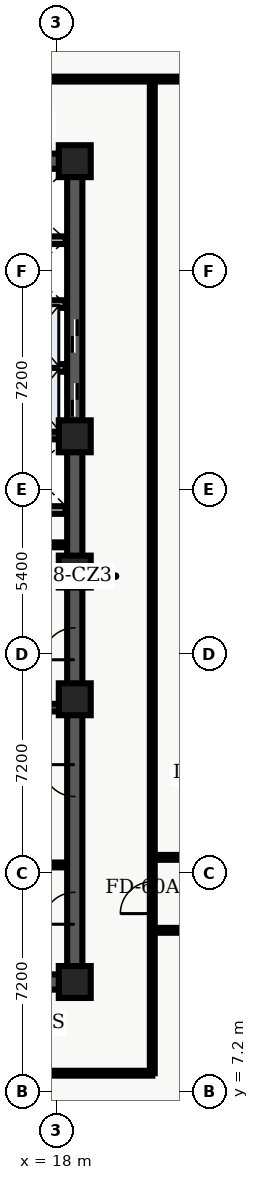
"""IFC4 building model, lengths in metres.
Left out: names, types, materials, properties, quantities, classifications, styles, units other than length and angle.
Written with IfcOpenShell. Run it as: python <this file> out.ifc"""

import sys

from ifc_helpers import new_model, entity, si_unit, converted_unit, direction, frame, origin_with_axes, origin_2d_with_axis, place, context, subcontext, project, spatial, polyline, rectangle, outline, extrude, element, fill, save


model = new_model("IFC4")
c1 = context("Model", 3, precision=1e-05, world=origin_with_axes(), true_north=direction((0.0, 1.0)))
c2 = subcontext(c1, "Body", "Model", "MODEL_VIEW")
j1 = project(units=[si_unit("LENGTHUNIT", "METRE"), converted_unit("PLANEANGLEUNIT", "DEGREE", entity("IfcPlaneAngleMeasure", 0.017), si_unit("PLANEANGLEUNIT", "RADIAN"), dimensions=[0, 0, 0, 0, 0, 0, 0])], contexts=[c1])
p1 = place(None, origin_with_axes())
s1 = spatial("IfcSite", under=j1, at=p1, CompositionType="ELEMENT")
p2 = place(p1, origin_with_axes())
s2 = spatial("IfcBuilding", under=s1, at=p2, CompositionType="ELEMENT")
p3 = place(p2, frame((0.0, 0.0, 156.3), z_axis=(0.0, 0.0, 1.0), x_axis=(1.0, 0.0, 0.0)))
s3 = spatial("IfcBuildingStorey", under=s2, at=p3, CompositionType="ELEMENT", Elevation=156.3)
p4 = place(p3, frame((11.4, 10.8, 0.0), z_axis=(0.0, 0.0, 1.0), x_axis=(1.0, 0.0, 0.0)))
e1 = element("IfcWall", 1, at=p4, inside=s3, PredefinedType="SHEAR", context=c2, shape_type="SweptSolid", body=[
    extrude(outline(polyline([(0.0, -0.25), (7.2, -0.25), (7.2, 0.25), (0.0, 0.25), (0.0, -0.25)])), origin_with_axes(), (0.0, 0.0, 1.0), 3.66),
])
p5 = place(p4, frame((2.625, 0.0, 0.0), z_axis=(0.0, 0.0, 1.0), x_axis=(1.0, 0.0, 0.0)))
e2 = element("IfcOpeningElement", 2, at=p5, cuts=e1, PredefinedType="OPENING", context=c2, shape_type="SweptSolid", body=[
    extrude(rectangle(XDim=1.05, YDim=0.52, at=origin_2d_with_axis()), origin_with_axes(), (0.0, 0.0, 1.0), 2.15),
])
p6 = place(p3, frame((11.4, 37.8, 0.0), z_axis=(0.0, 0.0, 1.0), x_axis=(1.0, 0.0, 0.0)))
e3 = element("IfcWall", 3, at=p6, inside=s3, PredefinedType="SHEAR", context=c2, shape_type="SweptSolid", body=[
    extrude(outline(polyline([(0.0, -0.25), (7.2, -0.25), (7.2, 0.25), (0.0, 0.25), (0.0, -0.25)])), origin_with_axes(), (0.0, 0.0, 1.0), 3.66),
])
p7 = place(p6, frame((2.625, 0.0, 0.0), z_axis=(0.0, 0.0, 1.0), x_axis=(1.0, 0.0, 0.0)))
e4 = element("IfcOpeningElement", 4, at=p7, cuts=e3, PredefinedType="OPENING", context=c2, shape_type="SweptSolid", body=[
    extrude(rectangle(XDim=1.05, YDim=0.52, at=origin_2d_with_axis()), origin_with_axes(), (0.0, 0.0, 1.0), 2.15),
])
p8 = place(p3, frame((18.6, 10.8, 0.0), z_axis=(0.0, 0.0, 1.0), x_axis=(0.0, 1.0, 0.0)))
e5 = element("IfcWall", 5, at=p8, inside=s3, PredefinedType="SHEAR", context=c2, shape_type="SweptSolid", body=[
    extrude(outline(polyline([(0.0, -0.25), (13.5, -0.25), (13.5, 0.25), (0.0, 0.25), (0.0, -0.25)])), origin_with_axes(), (0.0, 0.0, 1.0), 3.66),
])
p9 = place(p8, frame((11.125, 0.0, 0.0), z_axis=(0.0, 0.0, 1.0), x_axis=(1.0, 0.0, 0.0)))
e6 = element("IfcOpeningElement", 6, at=p9, cuts=e5, PredefinedType="OPENING", context=c2, shape_type="SweptSolid", body=[
    extrude(rectangle(XDim=1.05, YDim=0.52, at=origin_2d_with_axis()), origin_with_axes(), (0.0, 0.0, 1.0), 2.15),
])
p10 = place(p8, frame((2.425, 0.0, 0.0), z_axis=(0.0, 0.0, 1.0), x_axis=(1.0, 0.0, 0.0)))
e7 = element("IfcOpeningElement", 7, at=p10, cuts=e5, PredefinedType="OPENING", context=c2, shape_type="SweptSolid", body=[
    extrude(rectangle(XDim=1.05, YDim=0.52, at=origin_2d_with_axis()), origin_with_axes(), (0.0, 0.0, 1.0), 2.15),
])
p11 = place(p8, frame((6.625, 0.0, 0.0), z_axis=(0.0, 0.0, 1.0), x_axis=(1.0, 0.0, 0.0)))
e8 = element("IfcOpeningElement", 8, at=p11, cuts=e5, PredefinedType="OPENING", context=c2, shape_type="SweptSolid", body=[
    extrude(rectangle(XDim=1.05, YDim=0.52, at=origin_2d_with_axis()), origin_with_axes(), (0.0, 0.0, 1.0), 2.15),
])
p12 = place(p3, frame((18.6, 24.3, 0.0), z_axis=(0.0, 0.0, 1.0), x_axis=(0.0, 1.0, 0.0)))
e9 = element("IfcWall", 9, at=p12, inside=s3, PredefinedType="SHEAR", context=c2, shape_type="SweptSolid", body=[
    extrude(outline(polyline([(0.0, -0.25), (13.5, -0.25), (13.5, 0.25), (0.0, 0.25), (0.0, -0.25)])), origin_with_axes(), (0.0, 0.0, 1.0), 3.66),
])
p13 = place(p12, frame((5.65, 0.0, 0.0), z_axis=(0.0, 0.0, 1.0), x_axis=(1.0, 0.0, 0.0)))
e10 = element("IfcOpeningElement", 10, at=p13, cuts=e9, PredefinedType="OPENING", context=c2, shape_type="SweptSolid", body=[
    extrude(rectangle(XDim=1.1, YDim=0.52, at=origin_2d_with_axis()), origin_with_axes(), (0.0, 0.0, 1.0), 2.15),
])
p14 = place(p12, frame((7.75, 0.0, 0.0), z_axis=(0.0, 0.0, 1.0), x_axis=(1.0, 0.0, 0.0)))
e11 = element("IfcOpeningElement", 11, at=p14, cuts=e9, PredefinedType="OPENING", context=c2, shape_type="SweptSolid", body=[
    extrude(rectangle(XDim=1.1, YDim=0.52, at=origin_2d_with_axis()), origin_with_axes(), (0.0, 0.0, 1.0), 2.15),
])
for number, where, z_axis, x_axis in (
    (12, (11.65, 19.825, 0.0), (0.0, 0.0, 1.0), (1.0, 0.0, 0.0)),
    (13, (11.65, 28.775, 0.0), (0.0, 0.0, 1.0), (1.0, 0.0, 0.0)),
):
    element("IfcWall", number, at=place(p3, frame(where, z_axis=z_axis, x_axis=x_axis)), inside=s3, PredefinedType="SHEAR", context=c2, shape_type="SweptSolid", body=[
        extrude(outline(polyline([(0.0, -0.125), (6.7, -0.125), (6.7, 0.125), (0.0, 0.125), (0.0, -0.125)])), origin_with_axes(), (0.0, 0.0, 1.0), 3.66),
    ])
p15 = place(p3, frame((11.7, 24.1, 0.0), z_axis=(0.0, 0.0, 1.0), x_axis=(1.0, 0.0, 0.0)))
e14 = element("IfcWall", 14, at=p15, inside=s3, PredefinedType="SOLIDWALL", context=c2, shape_type="SweptSolid", body=[
    extrude(outline(polyline([(0.0, -0.125), (6.6, -0.125), (6.6, 0.125), (0.0, 0.125), (0.0, -0.125)])), origin_with_axes(), (0.0, 0.0, 1.0), 2.7),
])
p16 = place(p15, frame((3.75, 0.0, 0.0), z_axis=(0.0, 0.0, 1.0), x_axis=(1.0, 0.0, 0.0)))
e15 = element("IfcOpeningElement", 15, at=p16, cuts=e14, PredefinedType="OPENING", context=c2, shape_type="SweptSolid", body=[
    extrude(rectangle(XDim=0.9, YDim=0.27, at=origin_2d_with_axis()), origin_with_axes(), (0.0, 0.0, 1.0), 2.15),
])
p17 = place(p3, frame((11.7, 26.325, 0.0), z_axis=(0.0, 0.0, 1.0), x_axis=(1.0, 0.0, 0.0)))
e16 = element("IfcWall", 16, at=p17, inside=s3, PredefinedType="SOLIDWALL", context=c2, shape_type="SweptSolid", body=[
    extrude(outline(polyline([(0.0, -0.125), (6.6, -0.125), (6.6, 0.125), (0.0, 0.125), (0.0, -0.125)])), origin_with_axes(), (0.0, 0.0, 1.0), 2.7),
])
p18 = place(p17, frame((3.5, 0.0, 0.0), z_axis=(0.0, 0.0, 1.0), x_axis=(1.0, 0.0, 0.0)))
e17 = element("IfcOpeningElement", 17, at=p18, cuts=e16, PredefinedType="OPENING", context=c2, shape_type="SweptSolid", body=[
    extrude(rectangle(XDim=0.9, YDim=0.27, at=origin_2d_with_axis()), origin_with_axes(), (0.0, 0.0, 1.0), 2.15),
])
for number, where, z_axis, x_axis in (
    (18, (18.6, 10.8, 0.0), (0.0, 0.0, 1.0), (1.0, 0.0, 0.0)),
    (19, (18.6, 20.1, 0.0), (0.0, 0.0, 1.0), (1.0, 0.0, 0.0)),
    (20, (18.6, 24.3, 0.0), (0.0, 0.0, 1.0), (1.0, 0.0, 0.0)),
    (21, (18.6, 28.75, 0.0), (0.0, 0.0, 1.0), (1.0, 0.0, 0.0)),
    (22, (18.6, 37.8, 0.0), (0.0, 0.0, 1.0), (1.0, 0.0, 0.0)),
):
    element("IfcColumn", number, at=place(p3, frame(where, z_axis=z_axis, x_axis=x_axis)), inside=s3, PredefinedType="COLUMN", context=c2, shape_type="SweptSolid", body=[
        extrude(rectangle(XDim=1.05, YDim=1.05, at=origin_2d_with_axis()), origin_with_axes(), (0.0, 0.0, 1.0), 3.9),
    ])
p19 = place(p3, frame((14.62, 25.18, 0.0), z_axis=(0.0, 0.0, 1.0), x_axis=(1.0, 0.0, 0.0)))
e23 = element("IfcWall", 23, at=p19, inside=s3, PredefinedType="PARTITIONING", context=c2, shape_type="SweptSolid", body=[
    extrude(outline(polyline([(0.0, -0.08), (3.68, -0.08), (3.68, 0.08), (0.0, 0.08), (0.0, -0.08)])), origin_with_axes(), (0.0, 0.0, 1.0), 2.7),
])
p20 = place(p19, frame((1.95, 0.0, 0.0), z_axis=(0.0, 0.0, 1.0), x_axis=(1.0, 0.0, 0.0)))
e24 = element("IfcOpeningElement", 24, at=p20, cuts=e23, PredefinedType="OPENING", context=c2, shape_type="SweptSolid", body=[
    extrude(rectangle(XDim=0.9, YDim=0.18, at=origin_2d_with_axis()), origin_with_axes(), (0.0, 0.0, 1.0), 2.15),
])
p21 = place(p3, frame((15.84, 14.65, 0.0), z_axis=(0.0, 0.0, 1.0), x_axis=(1.0, 0.0, 0.0)))
e25 = element("IfcWall", 25, at=p21, inside=s3, PredefinedType="PARTITIONING", context=c2, shape_type="SweptSolid", body=[
    extrude(outline(polyline([(0.0, -0.08), (2.46, -0.08), (2.46, 0.08), (0.0, 0.08), (0.0, -0.08)])), origin_with_axes(), (0.0, 0.0, 1.0), 2.7),
])
for number, where, z_axis, x_axis in (
    (26, (15.84, 31.0, 0.0), (0.0, 0.0, 1.0), (1.0, 0.0, 0.0)),
    (27, (15.84, 33.1, 0.0), (0.0, 0.0, 1.0), (1.0, 0.0, 0.0)),
    (28, (15.84, 35.2, 0.0), (0.0, 0.0, 1.0), (1.0, 0.0, 0.0)),
):
    element("IfcWall", number, at=place(p3, frame(where, z_axis=z_axis, x_axis=x_axis)), inside=s3, PredefinedType="SOLIDWALL", context=c2, shape_type="SweptSolid", body=[
        extrude(outline(polyline([(0.0, -0.125), (2.46, -0.125), (2.46, 0.125), (0.0, 0.125), (0.0, -0.125)])), origin_with_axes(), (0.0, 0.0, 1.0), 2.7),
    ])
p22 = place(p3, frame((2.6, 7.8, 0.0), z_axis=(0.0, 0.0, 1.0), x_axis=(1.0, 0.0, 0.0)))
e29 = element("IfcWall", 29, at=p22, inside=s3, PredefinedType="PARTITIONING", context=c2, shape_type="SweptSolid", body=[
    extrude(outline(polyline([(0.0, -0.08), (18.55, -0.08), (18.55, 0.08), (0.0, 0.08), (0.0, -0.08)])), origin_with_axes(), (0.0, 0.0, 1.0), 2.7),
])
p23 = place(p22, frame((3.737, 0.0, 0.0), z_axis=(0.0, 0.0, 1.0), x_axis=(1.0, 0.0, 0.0)))
e30 = element("IfcOpeningElement", 30, at=p23, cuts=e29, PredefinedType="OPENING", context=c2, shape_type="SweptSolid", body=[
    extrude(rectangle(XDim=1.0, YDim=0.18, at=origin_2d_with_axis()), origin_with_axes(), (0.0, 0.0, 1.0), 2.15),
])
p24 = place(p22, frame((13.273, 0.0, 0.0), z_axis=(0.0, 0.0, 1.0), x_axis=(1.0, 0.0, 0.0)))
e31 = element("IfcOpeningElement", 31, at=p24, cuts=e29, PredefinedType="OPENING", context=c2, shape_type="SweptSolid", body=[
    extrude(rectangle(XDim=1.0, YDim=0.18, at=origin_2d_with_axis()), origin_with_axes(), (0.0, 0.0, 1.0), 2.15),
])
p25 = place(p3, frame((2.6, 40.5, 0.0), z_axis=(0.0, 0.0, 1.0), x_axis=(1.0, 0.0, 0.0)))
e32 = element("IfcWall", 32, at=p25, inside=s3, PredefinedType="PARTITIONING", context=c2, shape_type="SweptSolid", body=[
    extrude(outline(polyline([(0.0, -0.08), (20.117, -0.08), (20.117, 0.08), (0.0, 0.08), (0.0, -0.08)])), origin_with_axes(), (0.0, 0.0, 1.0), 2.7),
])
p26 = place(p25, frame((1.72, 0.0, 0.0), z_axis=(0.0, 0.0, 1.0), x_axis=(1.0, 0.0, 0.0)))
e33 = element("IfcOpeningElement", 33, at=p26, cuts=e32, PredefinedType="OPENING", context=c2, shape_type="SweptSolid", body=[
    extrude(rectangle(XDim=1.0, YDim=0.18, at=origin_2d_with_axis()), origin_with_axes(), (0.0, 0.0, 1.0), 2.15),
])
p27 = place(p25, frame((7.776, 0.0, 0.0), z_axis=(0.0, 0.0, 1.0), x_axis=(1.0, 0.0, 0.0)))
e34 = element("IfcOpeningElement", 34, at=p27, cuts=e32, PredefinedType="OPENING", context=c2, shape_type="SweptSolid", body=[
    extrude(rectangle(XDim=1.0, YDim=0.18, at=origin_2d_with_axis()), origin_with_axes(), (0.0, 0.0, 1.0), 2.15),
])
p28 = place(p25, frame((11.113, 0.0, 0.0), z_axis=(0.0, 0.0, 1.0), x_axis=(1.0, 0.0, 0.0)))
e35 = element("IfcOpeningElement", 35, at=p28, cuts=e32, PredefinedType="OPENING", context=c2, shape_type="SweptSolid", body=[
    extrude(rectangle(XDim=1.0, YDim=0.18, at=origin_2d_with_axis()), origin_with_axes(), (0.0, 0.0, 1.0), 2.15),
])
p29 = place(p25, frame((14.352, 0.0, 0.0), z_axis=(0.0, 0.0, 1.0), x_axis=(1.0, 0.0, 0.0)))
e36 = element("IfcOpeningElement", 36, at=p29, cuts=e32, PredefinedType="OPENING", context=c2, shape_type="SweptSolid", body=[
    extrude(rectangle(XDim=1.0, YDim=0.18, at=origin_2d_with_axis()), origin_with_axes(), (0.0, 0.0, 1.0), 2.15),
])
p30 = place(p3, frame((21.15, 7.8, 0.0), z_axis=(0.0, 0.0, 1.0), x_axis=(0.0, 1.0, 0.0)))
e37 = element("IfcWall", 37, at=p30, inside=s3, PredefinedType="PARTITIONING", context=c2, shape_type="SweptSolid", body=[
    extrude(outline(polyline([(0.0, -0.08), (32.7, -0.08), (32.7, 0.08), (0.0, 0.08), (0.0, -0.08)])), origin_with_axes(), (0.0, 0.0, 1.0), 2.7),
])
p31 = place(p30, frame((5.775, 0.0, 0.0), z_axis=(0.0, 0.0, 1.0), x_axis=(1.0, 0.0, 0.0)))
e38 = element("IfcOpeningElement", 38, at=p31, cuts=e37, PredefinedType="OPENING", context=c2, shape_type="SweptSolid", body=[
    extrude(rectangle(XDim=1.05, YDim=0.18, at=origin_2d_with_axis()), origin_with_axes(), (0.0, 0.0, 1.0), 2.15),
])
p32 = place(p3, frame((21.15, 12.5, 0.0), z_axis=(0.0, 0.0, 1.0), x_axis=(1.0, 0.0, 0.0)))
e39 = element("IfcWall", 39, at=p32, inside=s3, PredefinedType="PARTITIONING", context=c2, shape_type="SweptSolid", body=[
    extrude(outline(polyline([(0.0, -0.08), (15.2, -0.08), (15.2, 0.08), (0.0, 0.08), (0.0, -0.08)])), origin_with_axes(), (0.0, 0.0, 1.0), 2.7),
])
p33 = place(p32, frame((2.276, 0.0, 0.0), z_axis=(0.0, 0.0, 1.0), x_axis=(1.0, 0.0, 0.0)))
e40 = element("IfcOpeningElement", 40, at=p33, cuts=e39, PredefinedType="OPENING", context=c2, shape_type="SweptSolid", body=[
    extrude(rectangle(XDim=1.0, YDim=0.18, at=origin_2d_with_axis()), origin_with_axes(), (0.0, 0.0, 1.0), 2.15),
])
p34 = place(p32, frame((6.824, 0.0, 0.0), z_axis=(0.0, 0.0, 1.0), x_axis=(1.0, 0.0, 0.0)))
e41 = element("IfcOpeningElement", 41, at=p34, cuts=e39, PredefinedType="OPENING", context=c2, shape_type="SweptSolid", body=[
    extrude(rectangle(XDim=1.0, YDim=0.18, at=origin_2d_with_axis()), origin_with_axes(), (0.0, 0.0, 1.0), 2.15),
])
p35 = place(p32, frame((12.198, 0.0, 0.0), z_axis=(0.0, 0.0, 1.0), x_axis=(1.0, 0.0, 0.0)))
e42 = element("IfcOpeningElement", 42, at=p35, cuts=e39, PredefinedType="OPENING", context=c2, shape_type="SweptSolid", body=[
    extrude(rectangle(XDim=1.2, YDim=0.18, at=origin_2d_with_axis()), origin_with_axes(), (0.0, 0.0, 1.0), 2.2),
])
p36 = place(p3, frame((21.15, 14.9, 0.0), z_axis=(0.0, 0.0, 1.0), x_axis=(1.0, 0.0, 0.0)))
e43 = element("IfcWall", 43, at=p36, inside=s3, PredefinedType="PARTITIONING", context=c2, shape_type="SweptSolid", body=[
    extrude(outline(polyline([(0.0, -0.08), (15.2, -0.08), (15.2, 0.08), (0.0, 0.08), (0.0, -0.08)])), origin_with_axes(), (0.0, 0.0, 1.0), 2.7),
])
p37 = place(p36, frame((3.506, 0.0, 0.0), z_axis=(0.0, 0.0, 1.0), x_axis=(1.0, 0.0, 0.0)))
e44 = element("IfcOpeningElement", 44, at=p37, cuts=e43, PredefinedType="OPENING", context=c2, shape_type="SweptSolid", body=[
    extrude(rectangle(XDim=1.0, YDim=0.18, at=origin_2d_with_axis()), origin_with_axes(), (0.0, 0.0, 1.0), 2.15),
])
p38 = place(p36, frame((10.976, 0.0, 0.0), z_axis=(0.0, 0.0, 1.0), x_axis=(1.0, 0.0, 0.0)))
e45 = element("IfcOpeningElement", 45, at=p38, cuts=e43, PredefinedType="OPENING", context=c2, shape_type="SweptSolid", body=[
    extrude(rectangle(XDim=1.0, YDim=0.18, at=origin_2d_with_axis()), origin_with_axes(), (0.0, 0.0, 1.0), 2.15),
])
p39 = place(p12, frame((5.65, 0.0, 0.0), z_axis=(0.0, 0.0, 1.0), x_axis=(1.0, 0.0, 0.0)))
e46 = element("IfcDoor", 46, at=p39, inside=s3, OperationType="SLIDING_TO_LEFT", PredefinedType="DOOR", context=c2, shape_type="SweptSolid", body=[
    extrude(rectangle(XDim=1.1, YDim=0.09, at=origin_2d_with_axis()), origin_with_axes(), (0.0, 0.0, 1.0), 2.15),
])
fill(e10, e46)
p40 = place(p12, frame((7.75, 0.0, 0.0), z_axis=(0.0, 0.0, 1.0), x_axis=(1.0, 0.0, 0.0)))
e47 = element("IfcDoor", 47, at=p40, inside=s3, OperationType="SLIDING_TO_RIGHT", PredefinedType="DOOR", context=c2, shape_type="SweptSolid", body=[
    extrude(rectangle(XDim=1.1, YDim=0.09, at=origin_2d_with_axis()), origin_with_axes(), (0.0, 0.0, 1.0), 2.15),
])
fill(e11, e47)
p41 = place(p8, frame((11.125, 0.0, 0.0), z_axis=(0.0, 0.0, 1.0), x_axis=(1.0, 0.0, 0.0)))
e48 = element("IfcDoor", 48, at=p41, inside=s3, OperationType="SINGLE_SWING_LEFT", PredefinedType="DOOR", context=c2, shape_type="SweptSolid", body=[
    extrude(rectangle(XDim=1.05, YDim=0.09, at=origin_2d_with_axis()), origin_with_axes(), (0.0, 0.0, 1.0), 2.15),
])
fill(e6, e48)
p42 = place(p8, frame((2.425, 0.0, 0.0), z_axis=(0.0, 0.0, 1.0), x_axis=(1.0, 0.0, 0.0)))
e49 = element("IfcDoor", 49, at=p42, inside=s3, OperationType="SINGLE_SWING_LEFT", PredefinedType="DOOR", context=c2, shape_type="SweptSolid", body=[
    extrude(rectangle(XDim=1.05, YDim=0.09, at=origin_2d_with_axis()), origin_with_axes(), (0.0, 0.0, 1.0), 2.15),
])
fill(e7, e49)
p43 = place(p8, frame((6.625, 0.0, 0.0), z_axis=(0.0, 0.0, 1.0), x_axis=(1.0, 0.0, 0.0)))
e50 = element("IfcDoor", 50, at=p43, inside=s3, OperationType="SINGLE_SWING_RIGHT", PredefinedType="DOOR", context=c2, shape_type="SweptSolid", body=[
    extrude(rectangle(XDim=1.05, YDim=0.09, at=origin_2d_with_axis()), origin_with_axes(), (0.0, 0.0, 1.0), 2.15),
])
fill(e8, e50)
p44 = place(p30, frame((5.775, 0.0, 0.0), z_axis=(0.0, 0.0, 1.0), x_axis=(1.0, 0.0, 0.0)))
e51 = element("IfcDoor", 51, at=p44, inside=s3, OperationType="SINGLE_SWING_LEFT", PredefinedType="DOOR", context=c2, shape_type="SweptSolid", body=[
    extrude(rectangle(XDim=1.05, YDim=0.09, at=origin_2d_with_axis()), origin_with_axes(), (0.0, 0.0, 1.0), 2.15),
])
fill(e38, e51)
save(model, sys.argv[1])
